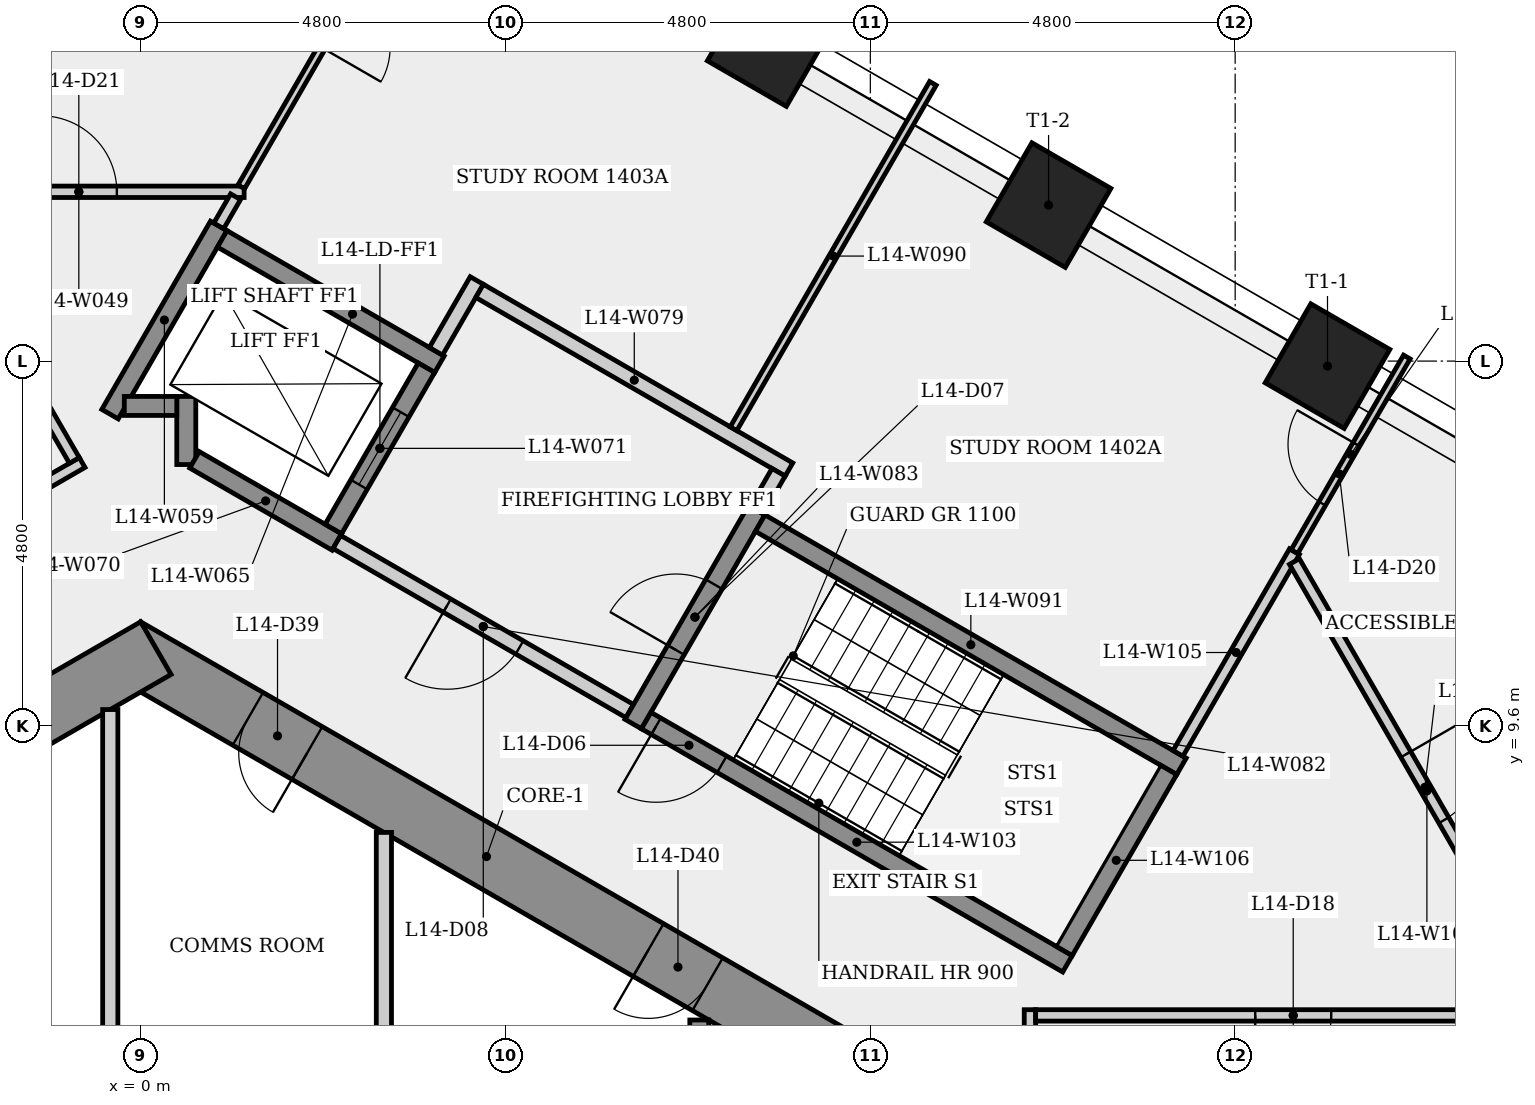
"""IFC4 building model, lengths in metres.
Left out: names, types, materials, properties, quantities, classifications, styles, units other than length and angle.
Written with IfcOpenShell. Run it as: python <this file> out.ifc"""

import sys

from ifc_helpers import new_model, si_unit, direction, frame, frame_2d, origin, origin_2d, place, context, subcontext, project, spatial, rectangle, extrude, element, fill, save


model = new_model("IFC4")
c1 = context("Model", 3, precision=1e-05, world=origin(), true_north=direction((0.0, 1.0)))
c2 = subcontext(c1, "Body", "Model", "MODEL_VIEW")
j1 = project(units=[si_unit("LENGTHUNIT", "METRE"), si_unit("PLANEANGLEUNIT", "RADIAN")], contexts=[c1])
p1 = place(None, origin())
s1 = spatial("IfcSite", under=j1, at=p1, CompositionType="ELEMENT")
p2 = place(p1, origin())
s2 = spatial("IfcBuilding", under=s1, at=p2, CompositionType="ELEMENT")
p3 = place(p2, frame((0.0, 0.0, 56.1)))
s3 = spatial("IfcBuildingStorey", under=s2, at=p3, CompositionType="ELEMENT", Elevation=56.1)
p4 = place(p3, frame((9.3, 5.138, 0.0), z_axis=(0.0, 0.0, 1.0), x_axis=(-0.866023993627, 0.500002442456, 0.0)))
e1 = element("IfcWall", 1, at=p4, inside=s3, PredefinedType="SHEAR", context=c2, shape_type="SweptSolid", body=[
    extrude(rectangle(XDim=10.97, YDim=0.8, at=frame_2d((5.485, 0.0))), origin(), (0.0, 0.0, 1.0), 3.4),
])
p5 = place(p4, frame((8.21, 0.0, 0.0)))
e2 = element("IfcOpeningElement", 2, at=p5, cuts=e1, PredefinedType="OPENING", context=c2, shape_type="SweptSolid", body=[
    extrude(rectangle(XDim=0.9, YDim=2.1, at=frame_2d((0.45, 1.05))), frame((0.0, 0.41, 0.0), z_axis=(0.0, -1.0, 0.0), x_axis=(1.0, 0.0, 0.0)), (0.0, 0.0, 1.0), 0.82),
])
p6 = place(p4, frame((2.126, 0.0, 0.0)))
e3 = element("IfcOpeningElement", 3, at=p6, cuts=e1, PredefinedType="OPENING", context=c2, shape_type="SweptSolid", body=[
    extrude(rectangle(XDim=0.9, YDim=2.1, at=frame_2d((0.45, 1.05))), frame((0.0, 0.41, 0.0), z_axis=(0.0, -1.0, 0.0), x_axis=(1.0, 0.0, 0.0)), (0.0, 0.0, 1.0), 0.82),
])
p7 = place(p3, frame((0.2, 10.623, 0.0), z_axis=(0.0, 0.0, 1.0), x_axis=(-0.866023993627, -0.500002442456, 0.0)))
e4 = element("IfcWall", 4, at=p7, inside=s3, PredefinedType="SHEAR", context=c2, shape_type="SweptSolid", body=[
    extrude(rectangle(XDim=10.97, YDim=0.8, at=frame_2d((5.485, 0.0))), origin(), (0.0, 0.0, 1.0), 3.4),
])
p8 = place(p7, frame((6.877, 0.0, 0.0)))
e5 = element("IfcOpeningElement", 5, at=p8, cuts=e4, PredefinedType="OPENING", context=c2, shape_type="SweptSolid", body=[
    extrude(rectangle(XDim=0.9, YDim=2.1, at=frame_2d((0.45, 1.05))), frame((0.0, 0.41, 0.0), z_axis=(0.0, -1.0, 0.0), x_axis=(1.0, 0.0, 0.0)), (0.0, 0.0, 1.0), 0.82),
])
for number, where, z_axis, x_axis in (
    (6, (15.615, 14.334, 0.0), (0.0, 0.0, 1.0), (0.5, 0.866, 0.0)),
    (7, (11.945, 16.452, 0.0), (0.0, 0.0, 1.0), (0.5, 0.866, 0.0)),
    (8, (8.276, 18.571, 0.0), (0.0, 0.0, 1.0), (0.5, 0.866, 0.0)),
):
    element("IfcColumn", number, at=place(p3, frame(where, z_axis=z_axis, x_axis=x_axis)), inside=s3, PredefinedType="COLUMN", context=c2, shape_type="SweptSolid", body=[
        extrude(rectangle(XDim=1.2, YDim=1.2, at=origin_2d()), origin(), (0.0, 0.0, 1.0), 3.4),
    ])
p9 = place(p3, frame((-10.8, 7.275, 0.0), z_axis=(0.0, 0.0, 1.0), x_axis=(0.866027969706, 0.499995555667, 0.0)))
e9 = element("IfcWall", 9, at=p9, inside=s3, PredefinedType="PARTITIONING", context=c2, shape_type="SweptSolid", body=[
    extrude(rectangle(XDim=11.582, YDim=0.15, at=frame_2d((5.791, 0.0))), origin(), (0.0, 0.0, 1.0), 3.05),
])
p10 = place(p9, frame((8.589, 0.0, 0.0)))
e10 = element("IfcOpeningElement", 10, at=p10, cuts=e9, PredefinedType="OPENING", context=c2, shape_type="SweptSolid", body=[
    extrude(rectangle(XDim=1.0, YDim=2.1, at=frame_2d((0.5, 1.05))), frame((0.0, 0.085, 0.0), z_axis=(0.0, -1.0, 0.0), x_axis=(1.0, 0.0, 0.0)), (0.0, 0.0, 1.0), 0.17),
])
p11 = place(p3, frame((-2.988, 16.627, 0.0), z_axis=(0.0, 0.0, 1.0), x_axis=(1.0, 0.0, 0.0)))
e11 = element("IfcWall", 11, at=p11, inside=s3, PredefinedType="PARTITIONING", context=c2, shape_type="SweptSolid", body=[
    extrude(rectangle(XDim=4.349, YDim=0.15, at=frame_2d((2.175, 0.0))), origin(), (0.0, 0.0, 1.0), 3.05),
])
p12 = place(p11, frame((1.675, 0.0, 0.0)))
e12 = element("IfcOpeningElement", 12, at=p12, cuts=e11, PredefinedType="OPENING", context=c2, shape_type="SweptSolid", body=[
    extrude(rectangle(XDim=1.0, YDim=2.1, at=frame_2d((0.5, 1.05))), frame((0.0, 0.085, 0.0), z_axis=(0.0, -1.0, 0.0), x_axis=(1.0, 0.0, 0.0)), (0.0, 0.0, 1.0), 0.17),
])
p13 = place(p3, frame((-0.873, 13.093, 0.0), z_axis=(0.0, 0.0, 1.0), x_axis=(-0.500031897912, 0.866006986733, 0.0)))
e13 = element("IfcWall", 13, at=p13, inside=s3, PredefinedType="PARTITIONING", context=c2, shape_type="SweptSolid", body=[
    extrude(rectangle(XDim=4.007, YDim=0.15, at=frame_2d((2.003, 0.0))), origin(), (0.0, 0.0, 1.0), 3.05),
])
p14 = place(p3, frame((-0.4, 9.815, 0.0), z_axis=(0.0, 0.0, 1.0), x_axis=(0.0, -1.0, 0.0)))
e14 = element("IfcWall", 14, at=p14, inside=s3, PredefinedType="PARTITIONING", context=c2, shape_type="SweptSolid", body=[
    extrude(rectangle(XDim=4.54, YDim=0.2, at=frame_2d((2.27, 0.0))), origin(), (0.0, 0.0, 1.0), 3.05),
])
p15 = place(p3, frame((-0.403, 13.702, 0.0), z_axis=(0.0, 0.0, 1.0), x_axis=(0.499976111731, 0.866039195244, 0.0)))
e15 = element("IfcWall", 15, at=p15, inside=s3, PredefinedType="SHEAR", context=c2, shape_type="SweptSolid", body=[
    extrude(rectangle(XDim=2.861, YDim=0.25, at=frame_2d((1.43, 0.0))), origin(), (0.0, 0.0, 1.0), 3.05),
])
p16 = place(p3, frame((0.6, 13.039, 0.0), z_axis=(0.0, 0.0, 1.0), x_axis=(0.0, 1.0, 0.0)))
e16 = element("IfcWall", 16, at=p16, inside=s3, PredefinedType="SHEAR", context=c2, shape_type="SweptSolid", body=[
    extrude(rectangle(XDim=0.896, YDim=0.25, at=frame_2d((0.448, 0.0))), origin(), (0.0, 0.0, 1.0), 3.05),
])
p17 = place(p3, frame((0.475, 13.81, 0.0), z_axis=(0.0, 0.0, 1.0), x_axis=(-1.0, 0.0, 0.0)))
e17 = element("IfcWall", 17, at=p17, inside=s3, PredefinedType="SHEAR", context=c2, shape_type="SweptSolid", body=[
    extrude(rectangle(XDim=0.691, YDim=0.25, at=frame_2d((0.345, 0.0))), origin(), (0.0, 0.0, 1.0), 3.4),
])
p18 = place(p3, frame((1.073, 16.008, 0.0), z_axis=(0.0, 0.0, 1.0), x_axis=(0.866040211805, -0.499974350878, 0.0)))
e18 = element("IfcWall", 18, at=p18, inside=s3, PredefinedType="SHEAR", context=c2, shape_type="SweptSolid", body=[
    extrude(rectangle(XDim=3.3, YDim=0.25, at=frame_2d((1.65, 0.0))), origin(), (0.0, 0.0, 1.0), 3.05),
])
p19 = place(p3, frame((1.249, 16.562, 0.0), z_axis=(0.0, 0.0, 1.0), x_axis=(-0.49999285859, -0.86602952684, 0.0)))
e19 = element("IfcWall", 19, at=p19, inside=s3, PredefinedType="PARTITIONING", context=c2, shape_type="SweptSolid", body=[
    extrude(rectangle(XDim=0.443, YDim=0.15, at=frame_2d((0.221, 0.0))), origin(), (0.0, 0.0, 1.0), 3.05),
])
p20 = place(p3, frame((2.581, 12.02, 0.0), z_axis=(0.0, 0.0, 1.0), x_axis=(-0.86603892542, 0.499976579108, 0.0)))
e20 = element("IfcWall", 20, at=p20, inside=s3, PredefinedType="SHEAR", context=c2, shape_type="SweptSolid", body=[
    extrude(rectangle(XDim=2.162, YDim=0.25, at=frame_2d((1.081, 0.0))), origin(), (0.0, 0.0, 1.0), 3.05),
])
p21 = place(p3, frame((2.535, 12.191, 0.0), z_axis=(0.0, 0.0, 1.0), x_axis=(0.500061746146, 0.865989751695, 0.0)))
e21 = element("IfcWall", 21, at=p21, inside=s3, PredefinedType="SHEAR", context=c2, shape_type="SweptSolid", body=[
    extrude(rectangle(XDim=2.45, YDim=0.25, at=frame_2d((1.225, 0.0))), origin(), (0.0, 0.0, 1.0), 3.4),
])
p22 = place(p21, frame((0.675, 0.0, 0.0)))
e22 = element("IfcOpeningElement", 22, at=p22, cuts=e21, PredefinedType="OPENING", context=c2, shape_type="SweptSolid", body=[
    extrude(rectangle(XDim=1.1, YDim=2.1, at=frame_2d((0.55, 1.05))), frame((0.0, 0.135, 0.0), z_axis=(0.0, -1.0, 0.0), x_axis=(1.0, 0.0, 0.0)), (0.0, 0.0, 1.0), 0.27),
])
p23 = place(p3, frame((3.2, 8.198, 0.0), z_axis=(0.0, 0.0, 1.0), x_axis=(0.0, -1.0, 0.0)))
e23 = element("IfcWall", 23, at=p23, inside=s3, PredefinedType="PARTITIONING", context=c2, shape_type="SweptSolid", body=[
    extrude(rectangle(XDim=2.924, YDim=0.2, at=frame_2d((1.462, 0.0))), origin(), (0.0, 0.0, 1.0), 3.05),
])
p24 = place(p3, frame((3.885, 14.529, 0.0), z_axis=(0.0, 0.0, 1.0), x_axis=(0.499997628298, 0.866026773083, 0.0)))
e24 = element("IfcWall", 24, at=p24, inside=s3, PredefinedType="PARTITIONING", context=c2, shape_type="SweptSolid", body=[
    extrude(rectangle(XDim=1.075, YDim=0.2, at=frame_2d((0.538, 0.0))), origin(), (0.0, 0.0, 1.0), 3.05),
])
p25 = place(p3, frame((4.188, 21.654, 0.0), z_axis=(0.0, 0.0, 1.0), x_axis=(-0.500021260655, -0.866013128592, 0.0)))
e25 = element("IfcWall", 25, at=p25, inside=s3, PredefinedType="PARTITIONING", context=c2, shape_type="SweptSolid", body=[
    extrude(rectangle(XDim=5.729, YDim=0.1, at=frame_2d((2.864, 0.0))), origin(), (0.0, 0.0, 1.0), 3.05),
])
p26 = place(p25, frame((2.712, 0.0, 0.0)))
e26 = element("IfcOpeningElement", 26, at=p26, cuts=e25, PredefinedType="OPENING", context=c2, shape_type="SweptSolid", body=[
    extrude(rectangle(XDim=0.9, YDim=2.1, at=frame_2d((0.45, 1.05))), frame((0.0, 0.06, 0.0), z_axis=(0.0, -1.0, 0.0), x_axis=(1.0, 0.0, 0.0)), (0.0, 0.0, 1.0), 0.12),
])
p27 = place(p3, frame((4.459, 15.323, 0.0), z_axis=(0.0, 0.0, 1.0), x_axis=(0.866016039709, -0.500016218704, 0.0)))
e27 = element("IfcWall", 27, at=p27, inside=s3, PredefinedType="PARTITIONING", context=c2, shape_type="SweptSolid", body=[
    extrude(rectangle(XDim=4.7, YDim=0.2, at=frame_2d((2.35, 0.0))), origin(), (0.0, 0.0, 1.0), 3.05),
])
p28 = place(p3, frame((6.435, 9.795, 0.0), z_axis=(0.0, 0.0, 1.0), x_axis=(-0.866012907634, 0.500021643343, 0.0)))
e28 = element("IfcWall", 28, at=p28, inside=s3, PredefinedType="PARTITIONING", context=c2, shape_type="SweptSolid", body=[
    extrude(rectangle(XDim=4.45, YDim=0.2, at=frame_2d((2.225, 0.0))), origin(), (0.0, 0.0, 1.0), 3.05),
])
p29 = place(p28, frame((1.675, 0.0, 0.0)))
e29 = element("IfcOpeningElement", 29, at=p29, cuts=e28, PredefinedType="OPENING", context=c2, shape_type="SweptSolid", body=[
    extrude(rectangle(XDim=1.1, YDim=2.1, at=frame_2d((0.55, 1.05))), frame((0.0, 0.11, 0.0), z_axis=(0.0, -1.0, 0.0), x_axis=(1.0, 0.0, 0.0)), (0.0, 0.0, 1.0), 0.22),
])
p30 = place(p3, frame((6.48, 9.624, 0.0), z_axis=(0.0, 0.0, 1.0), x_axis=(0.500017246033, 0.866015446554, 0.0)))
e30 = element("IfcWall", 30, at=p30, inside=s3, PredefinedType="SHEAR", context=c2, shape_type="SweptSolid", body=[
    extrude(rectangle(XDim=3.25, YDim=0.25, at=frame_2d((1.625, 0.0))), origin(), (0.0, 0.0, 1.0), 3.05),
])
p31 = place(p30, frame((1.125, 0.0, 0.0)))
e31 = element("IfcOpeningElement", 31, at=p31, cuts=e30, PredefinedType="OPENING", context=c2, shape_type="SweptSolid", body=[
    extrude(rectangle(XDim=1.0, YDim=2.1, at=frame_2d((0.5, 1.05))), frame((0.0, 0.135, 0.0), z_axis=(0.0, -1.0, 0.0), x_axis=(1.0, 0.0, 0.0)), (0.0, 0.0, 1.0), 0.27),
])
p32 = place(p3, frame((7.35, 5.73, 0.0), z_axis=(0.0, 0.0, 1.0), x_axis=(0.0, -1.0, 0.0)))
e32 = element("IfcWall", 32, at=p32, inside=s3, PredefinedType="SHEAR", context=c2, shape_type="SweptSolid", body=[
    extrude(rectangle(XDim=3.805, YDim=0.25, at=frame_2d((1.903, 0.0))), origin(), (0.0, 0.0, 1.0), 3.05),
])
p33 = place(p3, frame((7.8, 13.51, 0.0), z_axis=(0.0, 0.0, 1.0), x_axis=(0.499962800384, 0.866046879928, 0.0)))
e33 = element("IfcWall", 33, at=p33, inside=s3, PredefinedType="PARTITIONING", context=c2, shape_type="SweptSolid", body=[
    extrude(rectangle(XDim=5.247, YDim=0.1, at=frame_2d((2.623, 0.0))), origin(), (0.0, 0.0, 1.0), 3.05),
])
p34 = place(p3, frame((8.151, 12.268, 0.0), z_axis=(0.0, 0.0, 1.0), x_axis=(0.866025499775, -0.499999833739, 0.0)))
e34 = element("IfcWall", 34, at=p34, inside=s3, PredefinedType="SHEAR", context=c2, shape_type="SweptSolid", body=[
    extrude(rectangle(XDim=6.4, YDim=0.25, at=frame_2d((3.2, 0.0))), origin(), (0.0, 0.0, 1.0), 3.05),
])
p35 = place(p3, frame((8.393, 12.937, 0.0), z_axis=(0.0, 0.0, 1.0), x_axis=(-0.500065409566, -0.86598763626, 0.0)))
e35 = element("IfcWall", 35, at=p35, inside=s3, PredefinedType="PARTITIONING", context=c2, shape_type="SweptSolid", body=[
    extrude(rectangle(XDim=0.575, YDim=0.2, at=frame_2d((0.288, 0.0))), origin(), (0.0, 0.0, 1.0), 3.05),
])
p36 = place(p3, frame((11.7, -5.716, 0.0), z_axis=(0.0, 0.0, 1.0), x_axis=(0.0, 1.0, 0.0)))
e36 = element("IfcWall", 36, at=p36, inside=s3, PredefinedType="PARTITIONING", context=c2, shape_type="SweptSolid", body=[
    extrude(rectangle(XDim=11.582, YDim=0.15, at=frame_2d((5.791, 0.0))), origin(), (0.0, 0.0, 1.0), 3.05),
])
p37 = place(p36, frame((1.88, 0.0, 0.0)))
e37 = element("IfcOpeningElement", 37, at=p37, cuts=e36, PredefinedType="OPENING", context=c2, shape_type="SweptSolid", body=[
    extrude(rectangle(XDim=1.0, YDim=2.1, at=frame_2d((0.5, 1.05))), frame((0.0, 0.085, 0.0), z_axis=(0.0, -1.0, 0.0), x_axis=(1.0, 0.0, 0.0)), (0.0, 0.0, 1.0), 0.17),
])
p38 = place(p3, frame((12.194, 6.47, 0.0), z_axis=(0.0, 0.0, 1.0), x_axis=(-0.866025499775, 0.499999833739, 0.0)))
e38 = element("IfcWall", 38, at=p38, inside=s3, PredefinedType="SHEAR", context=c2, shape_type="SweptSolid", body=[
    extrude(rectangle(XDim=6.4, YDim=0.25, at=frame_2d((3.2, 0.0))), origin(), (0.0, 0.0, 1.0), 3.05),
])
p39 = place(p38, frame((5.25, 0.0, 0.0)))
e39 = element("IfcOpeningElement", 39, at=p39, cuts=e38, PredefinedType="OPENING", context=c2, shape_type="SweptSolid", body=[
    extrude(rectangle(XDim=1.0, YDim=2.1, at=frame_2d((0.5, 1.05))), frame((0.0, 0.135, 0.0), z_axis=(0.0, -1.0, 0.0), x_axis=(1.0, 0.0, 0.0)), (0.0, 0.0, 1.0), 0.27),
])
p40 = place(p3, frame((13.648, 9.239, 0.0), z_axis=(0.0, 0.0, 1.0), x_axis=(0.500012104326, 0.866018415236, 0.0)))
e40 = element("IfcWall", 40, at=p40, inside=s3, PredefinedType="PARTITIONING", context=c2, shape_type="SweptSolid", body=[
    extrude(rectangle(XDim=3.064, YDim=0.15, at=frame_2d((1.532, 0.0))), origin(), (0.0, 0.0, 1.0), 3.05),
])
p41 = place(p3, frame((13.523, 9.022, 0.0), z_axis=(0.0, 0.0, 1.0), x_axis=(-0.500034990121, -0.866005201286, 0.0)))
e41 = element("IfcWall", 41, at=p41, inside=s3, PredefinedType="SHEAR", context=c2, shape_type="SweptSolid", body=[
    extrude(rectangle(XDim=2.75, YDim=0.25, at=frame_2d((1.375, 0.0))), origin(), (0.0, 0.0, 1.0), 3.05),
])
p42 = place(p3, frame((15.18, 11.893, 0.0), z_axis=(0.0, 0.0, 1.0), x_axis=(0.500036881675, 0.866004109092, 0.0)))
e42 = element("IfcWall", 42, at=p42, inside=s3, PredefinedType="PARTITIONING", context=c2, shape_type="SweptSolid", body=[
    extrude(rectangle(XDim=2.957, YDim=0.1, at=frame_2d((1.479, 0.0))), origin(), (0.0, 0.0, 1.0), 3.05),
])
p43 = place(p42, frame((0.731, 0.0, 0.0)))
e43 = element("IfcOpeningElement", 43, at=p43, cuts=e42, PredefinedType="OPENING", context=c2, shape_type="SweptSolid", body=[
    extrude(rectangle(XDim=0.9, YDim=2.1, at=frame_2d((0.45, 1.05))), frame((0.0, 0.06, 0.0), z_axis=(0.0, -1.0, 0.0), x_axis=(1.0, 0.0, 0.0)), (0.0, 0.0, 1.0), 0.12),
])
p44 = place(p3, frame((15.18, 11.763, 0.0), z_axis=(0.0, 0.0, 1.0), x_axis=(0.499996319731, -0.866027528578, 0.0)))
e44 = element("IfcWall", 44, at=p44, inside=s3, PredefinedType="PARTITIONING", context=c2, shape_type="SweptSolid", body=[
    extrude(rectangle(XDim=6.971, YDim=0.15, at=frame_2d((3.485, 0.0))), origin(), (0.0, 0.0, 1.0), 3.05),
])
p45 = place(p44, frame((2.93, 0.0, 0.0)))
e45 = element("IfcOpeningElement", 45, at=p45, cuts=e44, PredefinedType="OPENING", context=c2, shape_type="SweptSolid", body=[
    extrude(rectangle(XDim=1.0, YDim=2.1, at=frame_2d((0.5, 1.05))), frame((0.0, 0.085, 0.0), z_axis=(0.0, -1.0, 0.0), x_axis=(1.0, 0.0, 0.0)), (0.0, 0.0, 1.0), 0.17),
])
p46 = place(p3, frame((18.553, 5.791, 0.0), z_axis=(0.0, 0.0, 1.0), x_axis=(-1.0, 0.0, 0.0)))
e46 = element("IfcWall", 46, at=p46, inside=s3, PredefinedType="PARTITIONING", context=c2, shape_type="SweptSolid", body=[
    extrude(rectangle(XDim=6.778, YDim=0.15, at=frame_2d((3.389, 0.0))), origin(), (0.0, 0.0, 1.0), 3.05),
])
p47 = place(p46, frame((2.889, 0.0, 0.0)))
e47 = element("IfcOpeningElement", 47, at=p47, cuts=e46, PredefinedType="OPENING", context=c2, shape_type="SweptSolid", body=[
    extrude(rectangle(XDim=1.0, YDim=2.1, at=frame_2d((0.5, 1.05))), frame((0.0, 0.085, 0.0), z_axis=(0.0, -1.0, 0.0), x_axis=(1.0, 0.0, 0.0)), (0.0, 0.0, 1.0), 0.17),
])
p48 = place(p39, origin())
e48 = element("IfcDoor", 48, at=p48, inside=s3, OperationType="SINGLE_SWING_RIGHT", PredefinedType="DOOR", context=c2, shape_type="SweptSolid", body=[
    extrude(rectangle(XDim=1.0, YDim=2.1, at=frame_2d((0.5, 1.05))), frame((0.0, 0.025, 0.0), z_axis=(0.0, -1.0, 0.0), x_axis=(1.0, 0.0, 0.0)), (0.0, 0.0, 1.0), 0.05),
])
fill(e39, e48)
p49 = place(p31, origin())
e49 = element("IfcDoor", 49, at=p49, inside=s3, OperationType="SINGLE_SWING_LEFT", PredefinedType="DOOR", context=c2, shape_type="SweptSolid", body=[
    extrude(rectangle(XDim=1.0, YDim=2.1, at=frame_2d((0.5, 1.05))), frame((0.0, 0.025, 0.0), z_axis=(0.0, -1.0, 0.0), x_axis=(1.0, 0.0, 0.0)), (0.0, 0.0, 1.0), 0.05),
])
fill(e31, e49)
p50 = place(p29, origin())
e50 = element("IfcDoor", 50, at=p50, inside=s3, OperationType="SINGLE_SWING_RIGHT", PredefinedType="DOOR", context=c2, shape_type="SweptSolid", body=[
    extrude(rectangle(XDim=1.1, YDim=2.1, at=frame_2d((0.55, 1.05))), frame((0.0, 0.025, 0.0), z_axis=(0.0, -1.0, 0.0), x_axis=(1.0, 0.0, 0.0)), (0.0, 0.0, 1.0), 0.05),
])
fill(e29, e50)
p51 = place(p22, origin())
e51 = element("IfcDoor", 51, at=p51, inside=s3, OperationType="SLIDING_TO_LEFT", PredefinedType="DOOR", context=c2, shape_type="SweptSolid", body=[
    extrude(rectangle(XDim=1.1, YDim=2.1, at=frame_2d((0.55, 1.05))), frame((0.0, 0.025, 0.0), z_axis=(0.0, -1.0, 0.0), x_axis=(1.0, 0.0, 0.0)), (0.0, 0.0, 1.0), 0.05),
])
fill(e22, e51)
p52 = place(p47, origin())
e52 = element("IfcDoor", 52, at=p52, inside=s3, OperationType="SINGLE_SWING_RIGHT", PredefinedType="DOOR", context=c2, shape_type="SweptSolid", body=[
    extrude(rectangle(XDim=1.0, YDim=2.1, at=frame_2d((0.5, 1.05))), frame((0.0, 0.025, 0.0), z_axis=(0.0, -1.0, 0.0), x_axis=(1.0, 0.0, 0.0)), (0.0, 0.0, 1.0), 0.05),
])
fill(e47, e52)
p53 = place(p45, origin())
e53 = element("IfcDoor", 53, at=p53, inside=s3, OperationType="SINGLE_SWING_LEFT", PredefinedType="DOOR", context=c2, shape_type="SweptSolid", body=[
    extrude(rectangle(XDim=1.0, YDim=2.1, at=frame_2d((0.5, 1.05))), frame((0.0, 0.025, 0.0), z_axis=(0.0, -1.0, 0.0), x_axis=(1.0, 0.0, 0.0)), (0.0, 0.0, 1.0), 0.05),
])
fill(e45, e53)
p54 = place(p43, origin())
e54 = element("IfcDoor", 54, at=p54, inside=s3, OperationType="SINGLE_SWING_RIGHT", PredefinedType="DOOR", context=c2, shape_type="SweptSolid", body=[
    extrude(rectangle(XDim=0.9, YDim=2.1, at=frame_2d((0.45, 1.05))), frame((0.0, 0.025, 0.0), z_axis=(0.0, -1.0, 0.0), x_axis=(1.0, 0.0, 0.0)), (0.0, 0.0, 1.0), 0.05),
])
fill(e43, e54)
p55 = place(p12, origin())
e55 = element("IfcDoor", 55, at=p55, inside=s3, OperationType="SINGLE_SWING_LEFT", PredefinedType="DOOR", context=c2, shape_type="SweptSolid", body=[
    extrude(rectangle(XDim=1.0, YDim=2.1, at=frame_2d((0.5, 1.05))), frame((0.0, 0.025, 0.0), z_axis=(0.0, -1.0, 0.0), x_axis=(1.0, 0.0, 0.0)), (0.0, 0.0, 1.0), 0.05),
])
fill(e12, e55)
p56 = place(p5, origin())
e56 = element("IfcDoor", 56, at=p56, inside=s3, OperationType="SINGLE_SWING_LEFT", PredefinedType="DOOR", context=c2, shape_type="SweptSolid", body=[
    extrude(rectangle(XDim=0.9, YDim=2.1, at=frame_2d((0.45, 1.05))), frame((0.0, 0.025, 0.0), z_axis=(0.0, -1.0, 0.0), x_axis=(1.0, 0.0, 0.0)), (0.0, 0.0, 1.0), 0.05),
])
fill(e2, e56)
p57 = place(p6, origin())
e57 = element("IfcDoor", 57, at=p57, inside=s3, OperationType="SINGLE_SWING_RIGHT", PredefinedType="DOOR", context=c2, shape_type="SweptSolid", body=[
    extrude(rectangle(XDim=0.9, YDim=2.1, at=frame_2d((0.45, 1.05))), frame((0.0, 0.025, 0.0), z_axis=(0.0, -1.0, 0.0), x_axis=(1.0, 0.0, 0.0)), (0.0, 0.0, 1.0), 0.05),
])
fill(e3, e57)
save(model, sys.argv[1])
